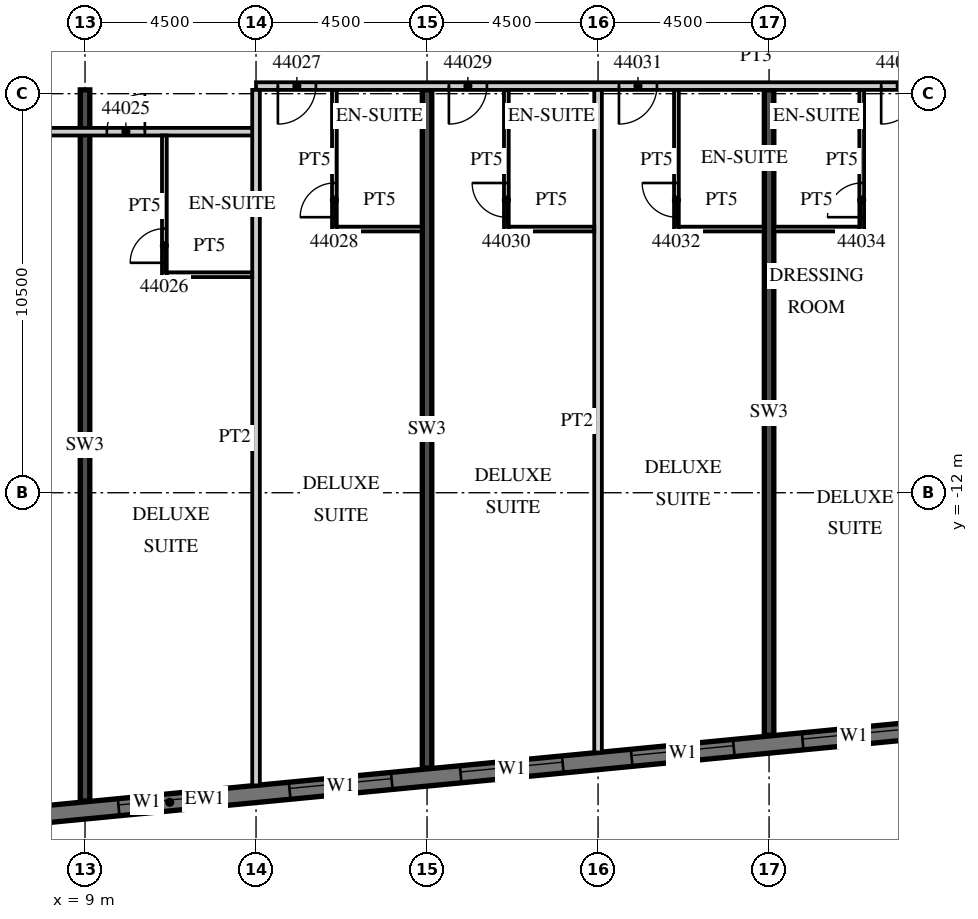
"""IFC4 building model, lengths in metres.
Left out: names, types, materials, properties, quantities, classifications, styles, units other than length and angle.
Written with IfcOpenShell. Run it as: python <this file> out.ifc"""

import sys

from ifc_helpers import new_model, si_unit, direction, frame, frame_2d, origin, place, context, subcontext, project, spatial, rectangle, extrude, element, fill, save


model = new_model("IFC4")
c1 = context("Model", 3, precision=1e-05, world=origin(), true_north=direction((0.0, 1.0)))
c2 = subcontext(c1, "Body", "Model", "MODEL_VIEW")
j1 = project(units=[si_unit("LENGTHUNIT", "METRE"), si_unit("PLANEANGLEUNIT", "RADIAN")], contexts=[c1])
p1 = place(None, origin())
s1 = spatial("IfcSite", under=j1, at=p1, CompositionType="ELEMENT")
p2 = place(p1, origin())
s2 = spatial("IfcBuilding", under=s1, at=p2, CompositionType="ELEMENT")
p3 = place(p2, frame((0.0, 0.0, 186.7)))
s3 = spatial("IfcBuildingStorey", under=s2, at=p3, CompositionType="ELEMENT", Elevation=186.7)
p4 = place(p3, frame((9.0, -20.112, 0.0), z_axis=(0.0, 0.0, 1.0), x_axis=(0.0, 1.0, 0.0)))
e1 = element("IfcWall", 1, at=p4, inside=s3, PredefinedType="SHEAR", context=c2, shape_type="SweptSolid", body=[
    extrude(rectangle(XDim=18.712, YDim=0.25, at=frame_2d((9.356, 0.0))), origin(), (0.0, 0.0, 1.0), 3.3),
])
p5 = place(p3, frame((18.0, -19.245, 0.0), z_axis=(0.0, 0.0, 1.0), x_axis=(0.0, 1.0, 0.0)))
e2 = element("IfcWall", 2, at=p5, inside=s3, PredefinedType="SHEAR", context=c2, shape_type="SweptSolid", body=[
    extrude(rectangle(XDim=17.845, YDim=0.25, at=frame_2d((8.923, 0.0))), origin(), (0.0, 0.0, 1.0), 3.3),
])
p6 = place(p3, frame((27.0, -18.379, 0.0), z_axis=(0.0, 0.0, 1.0), x_axis=(0.0, 1.0, 0.0)))
e3 = element("IfcWall", 3, at=p6, inside=s3, PredefinedType="SHEAR", context=c2, shape_type="SweptSolid", body=[
    extrude(rectangle(XDim=16.979, YDim=0.25, at=frame_2d((8.489, 0.0))), origin(), (0.0, 0.0, 1.0), 3.3),
])
p7 = place(p3, frame((-13.521, -22.529, 0.0), z_axis=(0.0, 0.0, 1.0), x_axis=(0.995396436651, 0.095843277819, 0.0)))
e4 = element("IfcWall", 4, at=p7, inside=s3, PredefinedType="SOLIDWALL", context=c2, shape_type="SweptSolid", body=[
    extrude(rectangle(XDim=51.578, YDim=0.45, at=frame_2d((25.789, 0.0))), origin(), (0.0, 0.0, 1.0), 3.02),
])
p8 = place(p7, frame((0.91, 0.0, 0.45)))
e5 = element("IfcOpeningElement", 5, at=p8, cuts=e4, PredefinedType="OPENING", context=c2, shape_type="SweptSolid", body=[
    extrude(rectangle(XDim=2.7, YDim=2.25, at=frame_2d((1.35, 1.125))), frame((0.0, 0.235, 0.0), z_axis=(0.0, -1.0, 0.0), x_axis=(1.0, 0.0, 0.0)), (0.0, 0.0, 1.0), 0.47),
])
p9 = place(p7, frame((5.431, 0.0, 0.45)))
e6 = element("IfcOpeningElement", 6, at=p9, cuts=e4, PredefinedType="OPENING", context=c2, shape_type="SweptSolid", body=[
    extrude(rectangle(XDim=2.7, YDim=2.25, at=frame_2d((1.35, 1.125))), frame((0.0, 0.235, 0.0), z_axis=(0.0, -1.0, 0.0), x_axis=(1.0, 0.0, 0.0)), (0.0, 0.0, 1.0), 0.47),
])
p10 = place(p7, frame((9.952, 0.0, 0.45)))
e7 = element("IfcOpeningElement", 7, at=p10, cuts=e4, PredefinedType="OPENING", context=c2, shape_type="SweptSolid", body=[
    extrude(rectangle(XDim=2.7, YDim=2.25, at=frame_2d((1.35, 1.125))), frame((0.0, 0.235, 0.0), z_axis=(0.0, -1.0, 0.0), x_axis=(1.0, 0.0, 0.0)), (0.0, 0.0, 1.0), 0.47),
])
p11 = place(p7, frame((14.473, 0.0, 0.45)))
e8 = element("IfcOpeningElement", 8, at=p11, cuts=e4, PredefinedType="OPENING", context=c2, shape_type="SweptSolid", body=[
    extrude(rectangle(XDim=2.7, YDim=2.25, at=frame_2d((1.35, 1.125))), frame((0.0, 0.235, 0.0), z_axis=(0.0, -1.0, 0.0), x_axis=(1.0, 0.0, 0.0)), (0.0, 0.0, 1.0), 0.47),
])
p12 = place(p7, frame((18.994, 0.0, 0.45)))
e9 = element("IfcOpeningElement", 9, at=p12, cuts=e4, PredefinedType="OPENING", context=c2, shape_type="SweptSolid", body=[
    extrude(rectangle(XDim=2.7, YDim=2.25, at=frame_2d((1.35, 1.125))), frame((0.0, 0.235, 0.0), z_axis=(0.0, -1.0, 0.0), x_axis=(1.0, 0.0, 0.0)), (0.0, 0.0, 1.0), 0.47),
])
p13 = place(p7, frame((23.514, 0.0, 0.45)))
e10 = element("IfcOpeningElement", 10, at=p13, cuts=e4, PredefinedType="OPENING", context=c2, shape_type="SweptSolid", body=[
    extrude(rectangle(XDim=2.7, YDim=2.25, at=frame_2d((1.35, 1.125))), frame((0.0, 0.235, 0.0), z_axis=(0.0, -1.0, 0.0), x_axis=(1.0, 0.0, 0.0)), (0.0, 0.0, 1.0), 0.47),
])
p14 = place(p7, frame((28.035, 0.0, 0.45)))
e11 = element("IfcOpeningElement", 11, at=p14, cuts=e4, PredefinedType="OPENING", context=c2, shape_type="SweptSolid", body=[
    extrude(rectangle(XDim=2.7, YDim=2.25, at=frame_2d((1.35, 1.125))), frame((0.0, 0.235, 0.0), z_axis=(0.0, -1.0, 0.0), x_axis=(1.0, 0.0, 0.0)), (0.0, 0.0, 1.0), 0.47),
])
p15 = place(p7, frame((32.556, 0.0, 0.45)))
e12 = element("IfcOpeningElement", 12, at=p15, cuts=e4, PredefinedType="OPENING", context=c2, shape_type="SweptSolid", body=[
    extrude(rectangle(XDim=2.7, YDim=2.25, at=frame_2d((1.35, 1.125))), frame((0.0, 0.235, 0.0), z_axis=(0.0, -1.0, 0.0), x_axis=(1.0, 0.0, 0.0)), (0.0, 0.0, 1.0), 0.47),
])
p16 = place(p7, frame((37.077, 0.0, 0.45)))
e13 = element("IfcOpeningElement", 13, at=p16, cuts=e4, PredefinedType="OPENING", context=c2, shape_type="SweptSolid", body=[
    extrude(rectangle(XDim=2.7, YDim=2.25, at=frame_2d((1.35, 1.125))), frame((0.0, 0.235, 0.0), z_axis=(0.0, -1.0, 0.0), x_axis=(1.0, 0.0, 0.0)), (0.0, 0.0, 1.0), 0.47),
])
p17 = place(p7, frame((41.598, 0.0, 0.45)))
e14 = element("IfcOpeningElement", 14, at=p17, cuts=e4, PredefinedType="OPENING", context=c2, shape_type="SweptSolid", body=[
    extrude(rectangle(XDim=2.7, YDim=2.25, at=frame_2d((1.35, 1.125))), frame((0.0, 0.235, 0.0), z_axis=(0.0, -1.0, 0.0), x_axis=(1.0, 0.0, 0.0)), (0.0, 0.0, 1.0), 0.47),
])
p18 = place(p7, frame((46.119, 0.0, 0.45)))
e15 = element("IfcOpeningElement", 15, at=p18, cuts=e4, PredefinedType="OPENING", context=c2, shape_type="SweptSolid", body=[
    extrude(rectangle(XDim=2.7, YDim=2.25, at=frame_2d((1.35, 1.125))), frame((0.0, 0.235, 0.0), z_axis=(0.0, -1.0, 0.0), x_axis=(1.0, 0.0, 0.0)), (0.0, 0.0, 1.0), 0.47),
])
p19 = place(p3, frame((-13.5, -2.5, 0.0), z_axis=(0.0, 0.0, 1.0), x_axis=(1.0, 0.0, 0.0)))
e16 = element("IfcWall", 16, at=p19, inside=s3, PredefinedType="PARTITIONING", context=c2, shape_type="SweptSolid", body=[
    extrude(rectangle(XDim=27.0, YDim=0.2, at=frame_2d((13.5, 0.0))), origin(), (0.0, 0.0, 1.0), 3.02),
])
p20 = place(p19, frame((0.575, 0.0, 0.0)))
e17 = element("IfcOpeningElement", 17, at=p20, cuts=e16, PredefinedType="OPENING", context=c2, shape_type="SweptSolid", body=[
    extrude(rectangle(XDim=1.0, YDim=2.1, at=frame_2d((0.5, 1.05))), frame((0.0, 0.11, 0.0), z_axis=(0.0, -1.0, 0.0), x_axis=(1.0, 0.0, 0.0)), (0.0, 0.0, 1.0), 0.22),
])
p21 = place(p19, frame((7.45, 0.0, 0.0)))
e18 = element("IfcOpeningElement", 18, at=p21, cuts=e16, PredefinedType="OPENING", context=c2, shape_type="SweptSolid", body=[
    extrude(rectangle(XDim=1.0, YDim=2.1, at=frame_2d((0.5, 1.05))), frame((0.0, 0.11, 0.0), z_axis=(0.0, -1.0, 0.0), x_axis=(1.0, 0.0, 0.0)), (0.0, 0.0, 1.0), 0.22),
])
p22 = place(p19, frame((9.55, 0.0, 0.0)))
e19 = element("IfcOpeningElement", 19, at=p22, cuts=e16, PredefinedType="OPENING", context=c2, shape_type="SweptSolid", body=[
    extrude(rectangle(XDim=1.0, YDim=2.1, at=frame_2d((0.5, 1.05))), frame((0.0, 0.11, 0.0), z_axis=(0.0, -1.0, 0.0), x_axis=(1.0, 0.0, 0.0)), (0.0, 0.0, 1.0), 0.22),
])
p23 = place(p19, frame((18.862, 0.0, 0.0)))
e20 = element("IfcOpeningElement", 20, at=p23, cuts=e16, PredefinedType="OPENING", context=c2, shape_type="SweptSolid", body=[
    extrude(rectangle(XDim=1.2, YDim=2.1, at=frame_2d((0.6, 1.05))), frame((0.0, 0.11, 0.0), z_axis=(0.0, -1.0, 0.0), x_axis=(1.0, 0.0, 0.0)), (0.0, 0.0, 1.0), 0.22),
])
p24 = place(p19, frame((23.075, 0.0, 0.0)))
e21 = element("IfcOpeningElement", 21, at=p24, cuts=e16, PredefinedType="OPENING", context=c2, shape_type="SweptSolid", body=[
    extrude(rectangle(XDim=1.0, YDim=2.1, at=frame_2d((0.5, 1.05))), frame((0.0, 0.11, 0.0), z_axis=(0.0, -1.0, 0.0), x_axis=(1.0, 0.0, 0.0)), (0.0, 0.0, 1.0), 0.22),
])
p25 = place(p3, frame((13.5, -1.3, 0.0), z_axis=(0.0, 0.0, 1.0), x_axis=(1.0, 0.0, 0.0)))
e22 = element("IfcWall", 22, at=p25, inside=s3, PredefinedType="PARTITIONING", context=c2, shape_type="SweptSolid", body=[
    extrude(rectangle(XDim=26.317, YDim=0.2, at=frame_2d((13.158, 0.0))), origin(), (0.0, 0.0, 1.0), 3.02),
])
p26 = place(p25, frame((0.575, 0.0, 0.0)))
e23 = element("IfcOpeningElement", 23, at=p26, cuts=e22, PredefinedType="OPENING", context=c2, shape_type="SweptSolid", body=[
    extrude(rectangle(XDim=1.0, YDim=2.1, at=frame_2d((0.5, 1.05))), frame((0.0, 0.11, 0.0), z_axis=(0.0, -1.0, 0.0), x_axis=(1.0, 0.0, 0.0)), (0.0, 0.0, 1.0), 0.22),
])
p27 = place(p25, frame((5.075, 0.0, 0.0)))
e24 = element("IfcOpeningElement", 24, at=p27, cuts=e22, PredefinedType="OPENING", context=c2, shape_type="SweptSolid", body=[
    extrude(rectangle(XDim=1.0, YDim=2.1, at=frame_2d((0.5, 1.05))), frame((0.0, 0.11, 0.0), z_axis=(0.0, -1.0, 0.0), x_axis=(1.0, 0.0, 0.0)), (0.0, 0.0, 1.0), 0.22),
])
p28 = place(p25, frame((9.55, 0.0, 0.0)))
e25 = element("IfcOpeningElement", 25, at=p28, cuts=e22, PredefinedType="OPENING", context=c2, shape_type="SweptSolid", body=[
    extrude(rectangle(XDim=1.0, YDim=2.1, at=frame_2d((0.5, 1.05))), frame((0.0, 0.11, 0.0), z_axis=(0.0, -1.0, 0.0), x_axis=(1.0, 0.0, 0.0)), (0.0, 0.0, 1.0), 0.22),
])
p29 = place(p25, frame((16.45, 0.0, 0.0)))
e26 = element("IfcOpeningElement", 26, at=p29, cuts=e22, PredefinedType="OPENING", context=c2, shape_type="SweptSolid", body=[
    extrude(rectangle(XDim=1.0, YDim=2.1, at=frame_2d((0.5, 1.05))), frame((0.0, 0.11, 0.0), z_axis=(0.0, -1.0, 0.0), x_axis=(1.0, 0.0, 0.0)), (0.0, 0.0, 1.0), 0.22),
])
p30 = place(p25, frame((18.55, 0.0, 0.0)))
e27 = element("IfcOpeningElement", 27, at=p30, cuts=e22, PredefinedType="OPENING", context=c2, shape_type="SweptSolid", body=[
    extrude(rectangle(XDim=1.0, YDim=2.1, at=frame_2d((0.5, 1.05))), frame((0.0, 0.11, 0.0), z_axis=(0.0, -1.0, 0.0), x_axis=(1.0, 0.0, 0.0)), (0.0, 0.0, 1.0), 0.22),
])
p31 = place(p25, frame((25.208, 0.0, 0.0)))
e28 = element("IfcOpeningElement", 28, at=p31, cuts=e22, PredefinedType="OPENING", context=c2, shape_type="SweptSolid", body=[
    extrude(rectangle(XDim=0.9, YDim=2.1, at=frame_2d((0.45, 1.05))), frame((0.0, 0.11, 0.0), z_axis=(0.0, -1.0, 0.0), x_axis=(1.0, 0.0, 0.0)), (0.0, 0.0, 1.0), 0.22),
])
p32 = place(p3, frame((13.5, -19.701, 0.0), z_axis=(0.0, 0.0, 1.0), x_axis=(0.0, 1.0, 0.0)))
e29 = element("IfcWall", 29, at=p32, inside=s3, PredefinedType="PARTITIONING", context=c2, shape_type="SweptSolid", body=[
    extrude(rectangle(XDim=18.301, YDim=0.2, at=frame_2d((9.15, 0.0))), origin(), (0.0, 0.0, 1.0), 3.02),
])
p33 = place(p3, frame((11.088, -6.325, 0.0), z_axis=(0.0, 0.0, 1.0), x_axis=(0.0, 1.0, 0.0)))
e30 = element("IfcWall", 30, at=p33, inside=s3, PredefinedType="PARTITIONING", context=c2, shape_type="SweptSolid", body=[
    extrude(rectangle(XDim=3.725, YDim=0.125, at=frame_2d((1.862, 0.0))), origin(), (0.0, 0.0, 1.0), 3.02),
])
p34 = place(p33, frame((0.375, 0.0, 0.0)))
e31 = element("IfcOpeningElement", 31, at=p34, cuts=e30, PredefinedType="OPENING", context=c2, shape_type="SweptSolid", body=[
    extrude(rectangle(XDim=0.9, YDim=2.1, at=frame_2d((0.45, 1.05))), frame((0.0, 0.073, 0.0), z_axis=(0.0, -1.0, 0.0), x_axis=(1.0, 0.0, 0.0)), (0.0, 0.0, 1.0), 0.145),
])
p35 = place(p3, frame((11.15, -6.263, 0.0), z_axis=(0.0, 0.0, 1.0), x_axis=(1.0, 0.0, 0.0)))
e32 = element("IfcWall", 32, at=p35, inside=s3, PredefinedType="PARTITIONING", context=c2, shape_type="SweptSolid", body=[
    extrude(rectangle(XDim=2.25, YDim=0.125, at=frame_2d((1.125, 0.0))), origin(), (0.0, 0.0, 1.0), 3.02),
])
p36 = place(p3, frame((15.562, -5.125, 0.0), z_axis=(0.0, 0.0, 1.0), x_axis=(0.0, 1.0, 0.0)))
e33 = element("IfcWall", 33, at=p36, inside=s3, PredefinedType="PARTITIONING", context=c2, shape_type="SweptSolid", body=[
    extrude(rectangle(XDim=3.725, YDim=0.125, at=frame_2d((1.863, 0.0))), origin(), (0.0, 0.0, 1.0), 3.02),
])
p37 = place(p36, frame((0.375, 0.0, 0.0)))
e34 = element("IfcOpeningElement", 34, at=p37, cuts=e33, PredefinedType="OPENING", context=c2, shape_type="SweptSolid", body=[
    extrude(rectangle(XDim=0.9, YDim=2.1, at=frame_2d((0.45, 1.05))), frame((0.0, 0.073, 0.0), z_axis=(0.0, -1.0, 0.0), x_axis=(1.0, 0.0, 0.0)), (0.0, 0.0, 1.0), 0.145),
])
p38 = place(p3, frame((15.625, -5.062, 0.0), z_axis=(0.0, 0.0, 1.0), x_axis=(1.0, 0.0, 0.0)))
e35 = element("IfcWall", 35, at=p38, inside=s3, PredefinedType="PARTITIONING", context=c2, shape_type="SweptSolid", body=[
    extrude(rectangle(XDim=2.25, YDim=0.125, at=frame_2d((1.125, 0.0))), origin(), (0.0, 0.0, 1.0), 3.02),
])
p39 = place(p3, frame((22.5, -18.834, 0.0), z_axis=(0.0, 0.0, 1.0), x_axis=(0.0, 1.0, 0.0)))
e36 = element("IfcWall", 36, at=p39, inside=s3, PredefinedType="PARTITIONING", context=c2, shape_type="SweptSolid", body=[
    extrude(rectangle(XDim=17.434, YDim=0.2, at=frame_2d((8.717, 0.0))), origin(), (0.0, 0.0, 1.0), 3.02),
])
p40 = place(p3, frame((20.087, -5.125, 0.0), z_axis=(0.0, 0.0, 1.0), x_axis=(0.0, 1.0, 0.0)))
e37 = element("IfcWall", 37, at=p40, inside=s3, PredefinedType="PARTITIONING", context=c2, shape_type="SweptSolid", body=[
    extrude(rectangle(XDim=3.725, YDim=0.125, at=frame_2d((1.863, 0.0))), origin(), (0.0, 0.0, 1.0), 3.02),
])
p41 = place(p40, frame((0.375, 0.0, 0.0)))
e38 = element("IfcOpeningElement", 38, at=p41, cuts=e37, PredefinedType="OPENING", context=c2, shape_type="SweptSolid", body=[
    extrude(rectangle(XDim=0.9, YDim=2.1, at=frame_2d((0.45, 1.05))), frame((0.0, 0.073, 0.0), z_axis=(0.0, -1.0, 0.0), x_axis=(1.0, 0.0, 0.0)), (0.0, 0.0, 1.0), 0.145),
])
p42 = place(p3, frame((20.15, -5.062, 0.0), z_axis=(0.0, 0.0, 1.0), x_axis=(1.0, 0.0, 0.0)))
e39 = element("IfcWall", 39, at=p42, inside=s3, PredefinedType="PARTITIONING", context=c2, shape_type="SweptSolid", body=[
    extrude(rectangle(XDim=2.25, YDim=0.125, at=frame_2d((1.125, 0.0))), origin(), (0.0, 0.0, 1.0), 3.02),
])
p43 = place(p3, frame((24.562, -5.125, 0.0), z_axis=(0.0, 0.0, 1.0), x_axis=(0.0, 1.0, 0.0)))
e40 = element("IfcWall", 40, at=p43, inside=s3, PredefinedType="PARTITIONING", context=c2, shape_type="SweptSolid", body=[
    extrude(rectangle(XDim=3.725, YDim=0.125, at=frame_2d((1.863, 0.0))), origin(), (0.0, 0.0, 1.0), 3.02),
])
p44 = place(p43, frame((0.375, 0.0, 0.0)))
e41 = element("IfcOpeningElement", 41, at=p44, cuts=e40, PredefinedType="OPENING", context=c2, shape_type="SweptSolid", body=[
    extrude(rectangle(XDim=0.9, YDim=2.1, at=frame_2d((0.45, 1.05))), frame((0.0, 0.073, 0.0), z_axis=(0.0, -1.0, 0.0), x_axis=(1.0, 0.0, 0.0)), (0.0, 0.0, 1.0), 0.145),
])
p45 = place(p3, frame((24.625, -5.062, 0.0), z_axis=(0.0, 0.0, 1.0), x_axis=(1.0, 0.0, 0.0)))
e42 = element("IfcWall", 42, at=p45, inside=s3, PredefinedType="PARTITIONING", context=c2, shape_type="SweptSolid", body=[
    extrude(rectangle(XDim=2.25, YDim=0.125, at=frame_2d((1.125, 0.0))), origin(), (0.0, 0.0, 1.0), 3.02),
])
p46 = place(p3, frame((29.438, -5.125, 0.0), z_axis=(0.0, 0.0, 1.0), x_axis=(0.0, 1.0, 0.0)))
e43 = element("IfcWall", 43, at=p46, inside=s3, PredefinedType="PARTITIONING", context=c2, shape_type="SweptSolid", body=[
    extrude(rectangle(XDim=3.725, YDim=0.125, at=frame_2d((1.863, 0.0))), origin(), (0.0, 0.0, 1.0), 3.02),
])
p47 = place(p46, frame((0.375, 0.0, 0.0)))
e44 = element("IfcOpeningElement", 44, at=p47, cuts=e43, PredefinedType="OPENING", context=c2, shape_type="SweptSolid", body=[
    extrude(rectangle(XDim=0.9, YDim=2.1, at=frame_2d((0.45, 1.05))), frame((0.0, 0.073, 0.0), z_axis=(0.0, -1.0, 0.0), x_axis=(1.0, 0.0, 0.0)), (0.0, 0.0, 1.0), 0.145),
])
p48 = place(p3, frame((27.125, -5.062, 0.0), z_axis=(0.0, 0.0, 1.0), x_axis=(1.0, 0.0, 0.0)))
e45 = element("IfcWall", 45, at=p48, inside=s3, PredefinedType="PARTITIONING", context=c2, shape_type="SweptSolid", body=[
    extrude(rectangle(XDim=2.25, YDim=0.125, at=frame_2d((1.125, 0.0))), origin(), (0.0, 0.0, 1.0), 3.02),
])
p49 = place(p13, origin())
e46 = element("IfcWindow", 46, at=p49, inside=s3, PartitioningType="SINGLE_PANEL", PredefinedType="WINDOW", context=c2, shape_type="SweptSolid", body=[
    extrude(rectangle(XDim=2.7, YDim=2.25, at=frame_2d((1.35, 1.125))), frame((0.0, 0.09, 0.0), z_axis=(0.0, -1.0, 0.0), x_axis=(1.0, 0.0, 0.0)), (0.0, 0.0, 1.0), 0.06),
])
fill(e10, e46)
p50 = place(p14, origin())
e47 = element("IfcWindow", 47, at=p50, inside=s3, PartitioningType="SINGLE_PANEL", PredefinedType="WINDOW", context=c2, shape_type="SweptSolid", body=[
    extrude(rectangle(XDim=2.7, YDim=2.25, at=frame_2d((1.35, 1.125))), frame((0.0, 0.09, 0.0), z_axis=(0.0, -1.0, 0.0), x_axis=(1.0, 0.0, 0.0)), (0.0, 0.0, 1.0), 0.06),
])
fill(e11, e47)
p51 = place(p15, origin())
e48 = element("IfcWindow", 48, at=p51, inside=s3, PartitioningType="SINGLE_PANEL", PredefinedType="WINDOW", context=c2, shape_type="SweptSolid", body=[
    extrude(rectangle(XDim=2.7, YDim=2.25, at=frame_2d((1.35, 1.125))), frame((0.0, 0.09, 0.0), z_axis=(0.0, -1.0, 0.0), x_axis=(1.0, 0.0, 0.0)), (0.0, 0.0, 1.0), 0.06),
])
fill(e12, e48)
p52 = place(p16, origin())
e49 = element("IfcWindow", 49, at=p52, inside=s3, PartitioningType="SINGLE_PANEL", PredefinedType="WINDOW", context=c2, shape_type="SweptSolid", body=[
    extrude(rectangle(XDim=2.7, YDim=2.25, at=frame_2d((1.35, 1.125))), frame((0.0, 0.09, 0.0), z_axis=(0.0, -1.0, 0.0), x_axis=(1.0, 0.0, 0.0)), (0.0, 0.0, 1.0), 0.06),
])
fill(e13, e49)
p53 = place(p17, origin())
e50 = element("IfcWindow", 50, at=p53, inside=s3, PartitioningType="SINGLE_PANEL", PredefinedType="WINDOW", context=c2, shape_type="SweptSolid", body=[
    extrude(rectangle(XDim=2.7, YDim=2.25, at=frame_2d((1.35, 1.125))), frame((0.0, 0.09, 0.0), z_axis=(0.0, -1.0, 0.0), x_axis=(1.0, 0.0, 0.0)), (0.0, 0.0, 1.0), 0.06),
])
fill(e14, e50)
p54 = place(p24, origin())
e51 = element("IfcDoor", 51, at=p54, inside=s3, OperationType="SINGLE_SWING_RIGHT", PredefinedType="DOOR", context=c2, shape_type="SweptSolid", body=[
    extrude(rectangle(XDim=1.0, YDim=2.1, at=frame_2d((0.5, 1.05))), frame((0.0, 0.025, 0.0), z_axis=(0.0, -1.0, 0.0), x_axis=(1.0, 0.0, 0.0)), (0.0, 0.0, 1.0), 0.05),
])
fill(e21, e51)
p55 = place(p34, origin())
e52 = element("IfcDoor", 52, at=p55, inside=s3, OperationType="SINGLE_SWING_LEFT", PredefinedType="DOOR", context=c2, shape_type="SweptSolid", body=[
    extrude(rectangle(XDim=0.9, YDim=2.1, at=frame_2d((0.45, 1.05))), frame((0.0, 0.025, 0.0), z_axis=(0.0, -1.0, 0.0), x_axis=(1.0, 0.0, 0.0)), (0.0, 0.0, 1.0), 0.05),
])
fill(e31, e52)
p56 = place(p26, origin())
e53 = element("IfcDoor", 53, at=p56, inside=s3, OperationType="SINGLE_SWING_LEFT", PredefinedType="DOOR", context=c2, shape_type="SweptSolid", body=[
    extrude(rectangle(XDim=1.0, YDim=2.1, at=frame_2d((0.5, 1.05))), frame((0.0, 0.025, 0.0), z_axis=(0.0, -1.0, 0.0), x_axis=(1.0, 0.0, 0.0)), (0.0, 0.0, 1.0), 0.05),
])
fill(e23, e53)
p57 = place(p37, origin())
e54 = element("IfcDoor", 54, at=p57, inside=s3, OperationType="SINGLE_SWING_LEFT", PredefinedType="DOOR", context=c2, shape_type="SweptSolid", body=[
    extrude(rectangle(XDim=0.9, YDim=2.1, at=frame_2d((0.45, 1.05))), frame((0.0, 0.025, 0.0), z_axis=(0.0, -1.0, 0.0), x_axis=(1.0, 0.0, 0.0)), (0.0, 0.0, 1.0), 0.05),
])
fill(e34, e54)
p58 = place(p27, origin())
e55 = element("IfcDoor", 55, at=p58, inside=s3, OperationType="SINGLE_SWING_LEFT", PredefinedType="DOOR", context=c2, shape_type="SweptSolid", body=[
    extrude(rectangle(XDim=1.0, YDim=2.1, at=frame_2d((0.5, 1.05))), frame((0.0, 0.025, 0.0), z_axis=(0.0, -1.0, 0.0), x_axis=(1.0, 0.0, 0.0)), (0.0, 0.0, 1.0), 0.05),
])
fill(e24, e55)
p59 = place(p41, origin())
e56 = element("IfcDoor", 56, at=p59, inside=s3, OperationType="SINGLE_SWING_RIGHT", PredefinedType="DOOR", context=c2, shape_type="SweptSolid", body=[
    extrude(rectangle(XDim=0.9, YDim=2.1, at=frame_2d((0.45, 1.05))), frame((0.0, 0.025, 0.0), z_axis=(0.0, -1.0, 0.0), x_axis=(1.0, 0.0, 0.0)), (0.0, 0.0, 1.0), 0.05),
])
fill(e38, e56)
p60 = place(p28, origin())
e57 = element("IfcDoor", 57, at=p60, inside=s3, OperationType="SINGLE_SWING_LEFT", PredefinedType="DOOR", context=c2, shape_type="SweptSolid", body=[
    extrude(rectangle(XDim=1.0, YDim=2.1, at=frame_2d((0.5, 1.05))), frame((0.0, 0.025, 0.0), z_axis=(0.0, -1.0, 0.0), x_axis=(1.0, 0.0, 0.0)), (0.0, 0.0, 1.0), 0.05),
])
fill(e25, e57)
p61 = place(p44, origin())
e58 = element("IfcDoor", 58, at=p61, inside=s3, OperationType="SINGLE_SWING_RIGHT", PredefinedType="DOOR", context=c2, shape_type="SweptSolid", body=[
    extrude(rectangle(XDim=0.9, YDim=2.1, at=frame_2d((0.45, 1.05))), frame((0.0, 0.025, 0.0), z_axis=(0.0, -1.0, 0.0), x_axis=(1.0, 0.0, 0.0)), (0.0, 0.0, 1.0), 0.05),
])
fill(e41, e58)
p62 = place(p29, origin())
e59 = element("IfcDoor", 59, at=p62, inside=s3, OperationType="SINGLE_SWING_LEFT", PredefinedType="DOOR", context=c2, shape_type="SweptSolid", body=[
    extrude(rectangle(XDim=1.0, YDim=2.1, at=frame_2d((0.5, 1.05))), frame((0.0, 0.025, 0.0), z_axis=(0.0, -1.0, 0.0), x_axis=(1.0, 0.0, 0.0)), (0.0, 0.0, 1.0), 0.05),
])
fill(e26, e59)
p63 = place(p47, origin())
e60 = element("IfcDoor", 60, at=p63, inside=s3, OperationType="SINGLE_SWING_LEFT", PredefinedType="DOOR", context=c2, shape_type="SweptSolid", body=[
    extrude(rectangle(XDim=0.9, YDim=2.1, at=frame_2d((0.45, 1.05))), frame((0.0, 0.025, 0.0), z_axis=(0.0, -1.0, 0.0), x_axis=(1.0, 0.0, 0.0)), (0.0, 0.0, 1.0), 0.05),
])
fill(e44, e60)
save(model, sys.argv[1])
